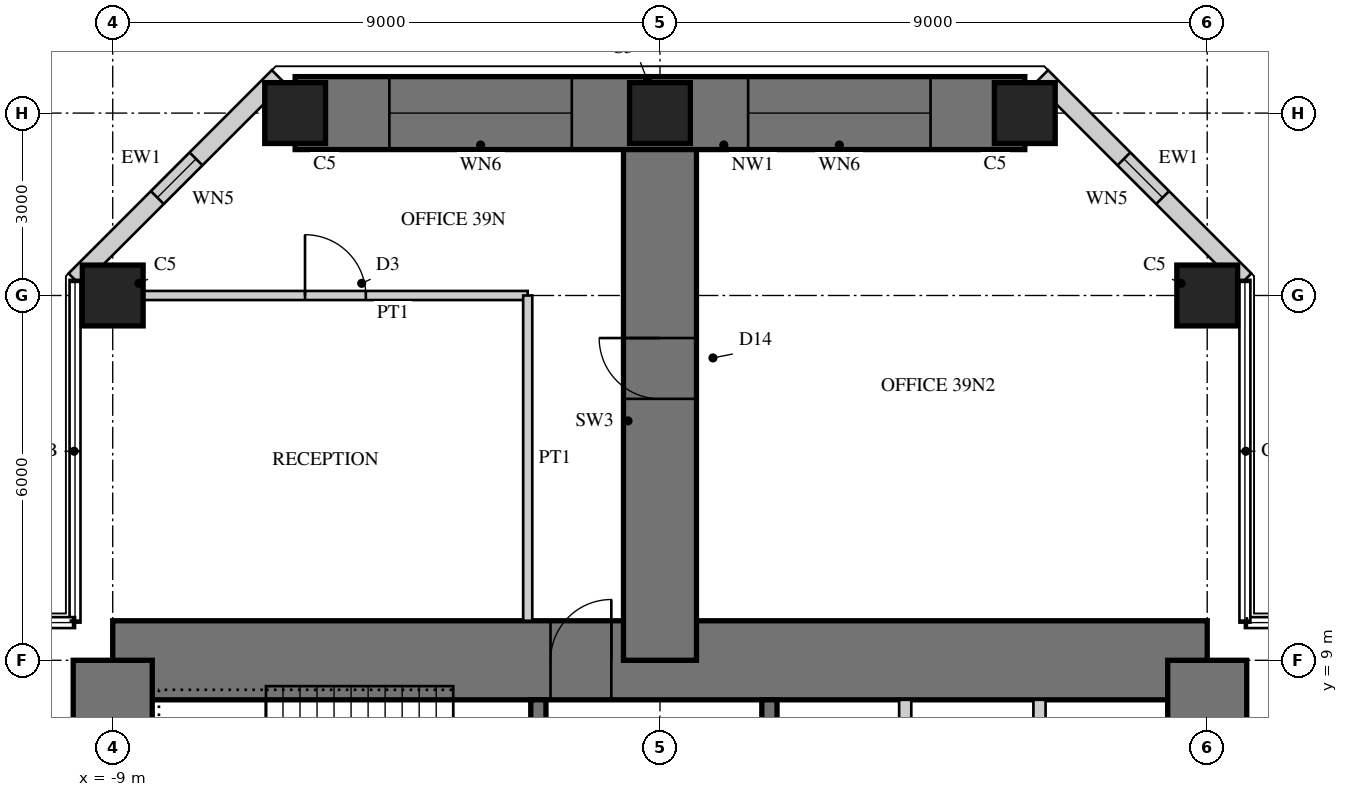
"""IFC4 building model, lengths in metres.
Left out: names, types, materials, properties, quantities, classifications, styles, units other than length and angle.
Written with IfcOpenShell. Run it as: python <this file> out.ifc"""

import sys

from ifc_helpers import new_model, si_unit, direction, frame, frame_2d, origin, origin_2d, place, context, subcontext, project, spatial, rectangle, hollow_rectangle, extrude, element, fill, save


model = new_model("IFC4")
c1 = context("Model", 3, precision=1e-05, world=origin(), true_north=direction((0.0, 1.0)))
c2 = subcontext(c1, "Body", "Model", "MODEL_VIEW")
j1 = project(units=[si_unit("LENGTHUNIT", "METRE"), si_unit("PLANEANGLEUNIT", "RADIAN")], contexts=[c1])
p1 = place(None, origin())
s1 = spatial("IfcSite", under=j1, at=p1, CompositionType="ELEMENT")
p2 = place(p1, origin())
s2 = spatial("IfcBuilding", under=s1, at=p2, CompositionType="ELEMENT")
p3 = place(p2, frame((0.0, 0.0, 160.5)))
s3 = spatial("IfcBuildingStorey", under=s2, at=p3, CompositionType="ELEMENT", Elevation=160.5)
p4 = place(p3, frame((9.0, 9.0, 0.0), z_axis=(0.0, 0.0, 1.0), x_axis=(-1.0, 0.0, 0.0)))
e1 = element("IfcWall", 1, at=p4, inside=s3, PredefinedType="SHEAR", context=c2, shape_type="SweptSolid", body=[
    extrude(rectangle(XDim=18.0, YDim=1.3, at=frame_2d((9.0, 0.0))), origin(), (0.0, 0.0, 1.0), 4.0),
])
p5 = place(p4, frame((9.8, 0.0, 0.0)))
e2 = element("IfcOpeningElement", 2, at=p5, cuts=e1, PredefinedType="OPENING", context=c2, shape_type="SweptSolid", body=[
    extrude(rectangle(XDim=1.0, YDim=2.4, at=frame_2d((0.5, 1.2))), frame((0.0, 0.66, 0.0), z_axis=(0.0, -1.0, 0.0), x_axis=(1.0, 0.0, 0.0)), (0.0, 0.0, 1.0), 1.32),
])
p6 = place(p3, frame((9.0, -9.0, 0.0), z_axis=(0.0, 0.0, 1.0), x_axis=(0.0, 1.0, 0.0)))
e3 = element("IfcWall", 3, at=p6, inside=s3, PredefinedType="SHEAR", context=c2, shape_type="SweptSolid", body=[
    extrude(rectangle(XDim=18.0, YDim=1.3, at=frame_2d((9.0, 0.0))), origin(), (0.0, 0.0, 1.0), 4.0),
])
p7 = place(p6, frame((9.8, 0.0, 0.0)))
e4 = element("IfcOpeningElement", 4, at=p7, cuts=e3, PredefinedType="OPENING", context=c2, shape_type="SweptSolid", body=[
    extrude(rectangle(XDim=1.0, YDim=2.4, at=frame_2d((0.5, 1.2))), frame((0.0, 0.66, 0.0), z_axis=(0.0, -1.0, 0.0), x_axis=(1.0, 0.0, 0.0)), (0.0, 0.0, 1.0), 1.32),
])
p8 = place(p3, frame((-9.0, 9.0, 0.0), z_axis=(0.0, 0.0, 1.0), x_axis=(0.0, -1.0, 0.0)))
e5 = element("IfcWall", 5, at=p8, inside=s3, PredefinedType="SHEAR", context=c2, shape_type="SweptSolid", body=[
    extrude(rectangle(XDim=18.0, YDim=1.3, at=frame_2d((9.0, 0.0))), origin(), (0.0, 0.0, 1.0), 4.0),
])
p9 = place(p8, frame((9.8, 0.0, 0.0)))
e6 = element("IfcOpeningElement", 6, at=p9, cuts=e5, PredefinedType="OPENING", context=c2, shape_type="SweptSolid", body=[
    extrude(rectangle(XDim=1.0, YDim=2.4, at=frame_2d((0.5, 1.2))), frame((0.0, 0.66, 0.0), z_axis=(0.0, -1.0, 0.0), x_axis=(1.0, 0.0, 0.0)), (0.0, 0.0, 1.0), 1.32),
])
p10 = place(p3, frame((1.8, 1.875, 0.0), z_axis=(0.0, 0.0, 1.0), x_axis=(0.0, 1.0, 0.0)))
e7 = element("IfcWall", 7, at=p10, inside=s3, PredefinedType="SHEAR", context=c2, shape_type="SweptSolid", body=[
    extrude(rectangle(XDim=6.475, YDim=0.25, at=frame_2d((3.238, 0.0))), origin(), (0.0, 0.0, 1.0), 4.0),
])
p11 = place(p10, frame((1.875, 0.0, 0.0)))
e8 = element("IfcOpeningElement", 8, at=p11, cuts=e7, PredefinedType="OPENING", context=c2, shape_type="SweptSolid", body=[
    extrude(rectangle(XDim=1.6, YDim=2.4, at=frame_2d((0.8, 1.2))), frame((0.0, 0.135, 0.0), z_axis=(0.0, -1.0, 0.0), x_axis=(1.0, 0.0, 0.0)), (0.0, 0.0, 1.0), 0.27),
])
for number, where, z_axis, x_axis in (
    (9, (4.033, 5.975, 0.0), (0.0, 0.0, 1.0), (0.0, 1.0, 0.0)),
    (10, (6.242, 5.975, 0.0), (0.0, 0.0, 1.0), (0.0, 1.0, 0.0)),
):
    element("IfcWall", number, at=place(p3, frame(where, z_axis=z_axis, x_axis=x_axis)), inside=s3, PredefinedType="PARTITIONING", context=c2, shape_type="SweptSolid", body=[
        extrude(rectangle(XDim=2.375, YDim=0.2, at=frame_2d((1.188, 0.0))), origin(), (0.0, 0.0, 1.0), 4.0),
    ])
p12 = place(p3, frame((-2.0, 1.675, 0.0), z_axis=(0.0, 0.0, 1.0), x_axis=(0.0, 1.0, 0.0)))
e11 = element("IfcWall", 11, at=p12, inside=s3, PredefinedType="SHEAR", context=c2, shape_type="SweptSolid", body=[
    extrude(rectangle(XDim=6.675, YDim=0.25, at=frame_2d((3.337, 0.0))), origin(), (0.0, 0.0, 1.0), 4.0),
])
p13 = place(p12, frame((0.725, 0.0, 0.0)))
e12 = element("IfcOpeningElement", 12, at=p13, cuts=e11, PredefinedType="OPENING", context=c2, shape_type="SweptSolid", body=[
    extrude(rectangle(XDim=1.0, YDim=2.1, at=frame_2d((0.5, 1.05))), frame((0.0, 0.135, 0.0), z_axis=(0.0, -1.0, 0.0), x_axis=(1.0, 0.0, 0.0)), (0.0, 0.0, 1.0), 0.27),
])
p14 = place(p3, frame((0.0, 9.0, 0.0), z_axis=(0.0, 0.0, 1.0), x_axis=(0.0, 1.0, 0.0)))
e13 = element("IfcWall", 13, at=p14, inside=s3, PredefinedType="SHEAR", context=c2, shape_type="SweptSolid", body=[
    extrude(rectangle(XDim=9.0, YDim=1.2, at=frame_2d((4.5, 0.0))), origin(), (0.0, 0.0, 1.0), 4.0),
])
p15 = place(p14, frame((4.3, 0.0, 0.0)))
e14 = element("IfcOpeningElement", 14, at=p15, cuts=e13, PredefinedType="OPENING", context=c2, shape_type="SweptSolid", body=[
    extrude(rectangle(XDim=1.0, YDim=2.2, at=frame_2d((0.5, 1.1))), frame((0.0, 0.61, 0.0), z_axis=(0.0, -1.0, 0.0), x_axis=(1.0, 0.0, 0.0)), (0.0, 0.0, 1.0), 1.22),
])
p16 = place(p3, frame((6.0, 18.0, 0.0), z_axis=(0.0, 0.0, 1.0), x_axis=(-1.0, 0.0, 0.0)))
e15 = element("IfcWall", 15, at=p16, inside=s3, PredefinedType="SHEAR", context=c2, shape_type="SweptSolid", body=[
    extrude(rectangle(XDim=12.0, YDim=1.2, at=frame_2d((6.0, 0.0))), origin(), (0.0, 0.0, 1.0), 4.0),
])
p17 = place(p16, frame((1.55, 0.0, 0.6)))
e16 = element("IfcOpeningElement", 16, at=p17, cuts=e15, PredefinedType="OPENING", context=c2, shape_type="SweptSolid", body=[
    extrude(rectangle(XDim=3.0, YDim=2.4, at=frame_2d((1.5, 1.2))), frame((0.0, 0.61, 0.0), z_axis=(0.0, -1.0, 0.0), x_axis=(1.0, 0.0, 0.0)), (0.0, 0.0, 1.0), 1.22),
])
p18 = place(p16, frame((7.45, 0.0, 0.6)))
e17 = element("IfcOpeningElement", 17, at=p18, cuts=e15, PredefinedType="OPENING", context=c2, shape_type="SweptSolid", body=[
    extrude(rectangle(XDim=3.0, YDim=2.4, at=frame_2d((1.5, 1.2))), frame((0.0, 0.61, 0.0), z_axis=(0.0, -1.0, 0.0), x_axis=(1.0, 0.0, 0.0)), (0.0, 0.0, 1.0), 1.22),
])
for number, where, z_axis, x_axis in (
    (18, (9.0, 15.0, 0.0), (0.0, 0.0, 1.0), (1.0, 0.0, 0.0)),
    (19, (-9.0, 15.0, 0.0), (0.0, 0.0, 1.0), (1.0, 0.0, 0.0)),
    (20, (6.0, 18.0, 0.0), (0.0, 0.0, 1.0), (1.0, 0.0, 0.0)),
    (21, (0.0, 18.0, 0.0), (0.0, 0.0, 1.0), (1.0, 0.0, 0.0)),
    (22, (-6.0, 18.0, 0.0), (0.0, 0.0, 1.0), (1.0, 0.0, 0.0)),
):
    element("IfcColumn", number, at=place(p3, frame(where, z_axis=z_axis, x_axis=x_axis)), inside=s3, PredefinedType="COLUMN", context=c2, shape_type="SweptSolid", body=[
        extrude(rectangle(XDim=1.0, YDim=1.0, at=origin_2d()), origin(), (0.0, 0.0, 1.0), 4.0),
    ])
p19 = place(p3, frame((9.62, 15.257, 0.0), z_axis=(0.0, 0.0, 1.0), x_axis=(-0.707106781187, 0.707106781187, 0.0)))
e23 = element("IfcWall", 23, at=p19, inside=s3, PredefinedType="SOLIDWALL", context=c2, shape_type="SweptSolid", body=[
    extrude(rectangle(XDim=4.728, YDim=0.3, at=frame_2d((2.364, 0.0))), origin(), (0.0, 0.0, 1.0), 3.75),
])
p20 = place(p19, frame((1.914, 0.0, 0.3)))
e24 = element("IfcOpeningElement", 24, at=p20, cuts=e23, PredefinedType="OPENING", context=c2, shape_type="SweptSolid", body=[
    extrude(rectangle(XDim=0.9, YDim=2.4, at=frame_2d((0.45, 1.2))), frame((0.0, 0.16, 0.0), z_axis=(0.0, -1.0, 0.0), x_axis=(1.0, 0.0, 0.0)), (0.0, 0.0, 1.0), 0.32),
])
p21 = place(p3, frame((-6.277, 18.6, 0.0), z_axis=(0.0, 0.0, 1.0), x_axis=(-0.707106781187, -0.707106781187, 0.0)))
e25 = element("IfcWall", 25, at=p21, inside=s3, PredefinedType="SOLIDWALL", context=c2, shape_type="SweptSolid", body=[
    extrude(rectangle(XDim=4.728, YDim=0.3, at=frame_2d((2.364, 0.0))), origin(), (0.0, 0.0, 1.0), 3.75),
])
p22 = place(p21, frame((1.914, 0.0, 0.3)))
e26 = element("IfcOpeningElement", 26, at=p22, cuts=e25, PredefinedType="OPENING", context=c2, shape_type="SweptSolid", body=[
    extrude(rectangle(XDim=0.9, YDim=2.4, at=frame_2d((0.45, 1.2))), frame((0.0, 0.16, 0.0), z_axis=(0.0, -1.0, 0.0), x_axis=(1.0, 0.0, 0.0)), (0.0, 0.0, 1.0), 0.32),
])
p23 = place(p3, frame((-2.175, 15.0, 0.0), z_axis=(0.0, 0.0, 1.0), x_axis=(-1.0, 0.0, 0.0)))
e27 = element("IfcWall", 27, at=p23, inside=s3, PredefinedType="PARTITIONING", context=c2, shape_type="SweptSolid", body=[
    extrude(rectangle(XDim=6.325, YDim=0.15, at=frame_2d((3.163, 0.0))), origin(), (0.0, 0.0, 1.0), 2.7),
])
p24 = place(p23, frame((2.663, 0.0, 0.0)))
e28 = element("IfcOpeningElement", 28, at=p24, cuts=e27, PredefinedType="OPENING", context=c2, shape_type="SweptSolid", body=[
    extrude(rectangle(XDim=1.0, YDim=2.1, at=frame_2d((0.5, 1.05))), frame((0.0, 0.085, 0.0), z_axis=(0.0, -1.0, 0.0), x_axis=(1.0, 0.0, 0.0)), (0.0, 0.0, 1.0), 0.17),
])
p25 = place(p3, frame((-2.175, 9.65, 0.0), z_axis=(0.0, 0.0, 1.0), x_axis=(0.0, 1.0, 0.0)))
e29 = element("IfcWall", 29, at=p25, inside=s3, PredefinedType="PARTITIONING", context=c2, shape_type="SweptSolid", body=[
    extrude(rectangle(XDim=5.35, YDim=0.15, at=frame_2d((2.675, 0.0))), origin(), (0.0, 0.0, 1.0), 3.75),
])
p26 = place(p20, origin())
e30 = element("IfcWindow", 30, at=p26, inside=s3, PartitioningType="SINGLE_PANEL", PredefinedType="WINDOW", context=c2, shape_type="SweptSolid", body=[
    extrude(hollow_rectangle(XDim=0.9, YDim=2.4, WallThickness=0.06, at=frame_2d((0.45, 1.2))), frame((0.0, 0.03, 0.0), z_axis=(0.0, -1.0, 0.0), x_axis=(1.0, 0.0, 0.0)), (0.0, 0.0, 1.0), 0.06),
    extrude(rectangle(XDim=0.779, YDim=2.279, at=frame_2d((0.45, 1.2))), frame((0.0, 0.03, 0.0), z_axis=(0.0, -1.0, 0.0), x_axis=(1.0, 0.0, 0.0)), (0.0, 0.0, 1.0), 0.06),
])
fill(e24, e30)
p27 = place(p17, origin())
e31 = element("IfcWindow", 31, at=p27, inside=s3, PartitioningType="SINGLE_PANEL", PredefinedType="WINDOW", context=c2, shape_type="SweptSolid", body=[
    extrude(hollow_rectangle(XDim=3.0, YDim=2.4, WallThickness=0.06, at=frame_2d((1.5, 1.2))), frame((0.0, 0.03, 0.0), z_axis=(0.0, -1.0, 0.0), x_axis=(1.0, 0.0, 0.0)), (0.0, 0.0, 1.0), 0.06),
    extrude(rectangle(XDim=2.879, YDim=2.279, at=frame_2d((1.5, 1.2))), frame((0.0, 0.03, 0.0), z_axis=(0.0, -1.0, 0.0), x_axis=(1.0, 0.0, 0.0)), (0.0, 0.0, 1.0), 0.06),
])
fill(e16, e31)
p28 = place(p18, origin())
e32 = element("IfcWindow", 32, at=p28, inside=s3, PartitioningType="SINGLE_PANEL", PredefinedType="WINDOW", context=c2, shape_type="SweptSolid", body=[
    extrude(hollow_rectangle(XDim=3.0, YDim=2.4, WallThickness=0.06, at=frame_2d((1.5, 1.2))), frame((0.0, 0.03, 0.0), z_axis=(0.0, -1.0, 0.0), x_axis=(1.0, 0.0, 0.0)), (0.0, 0.0, 1.0), 0.06),
    extrude(rectangle(XDim=2.879, YDim=2.279, at=frame_2d((1.5, 1.2))), frame((0.0, 0.03, 0.0), z_axis=(0.0, -1.0, 0.0), x_axis=(1.0, 0.0, 0.0)), (0.0, 0.0, 1.0), 0.06),
])
fill(e17, e32)
p29 = place(p22, origin())
e33 = element("IfcWindow", 33, at=p29, inside=s3, PartitioningType="SINGLE_PANEL", PredefinedType="WINDOW", context=c2, shape_type="SweptSolid", body=[
    extrude(hollow_rectangle(XDim=0.9, YDim=2.4, WallThickness=0.06, at=frame_2d((0.45, 1.2))), frame((0.0, 0.03, 0.0), z_axis=(0.0, -1.0, 0.0), x_axis=(1.0, 0.0, 0.0)), (0.0, 0.0, 1.0), 0.06),
    extrude(rectangle(XDim=0.779, YDim=2.279, at=frame_2d((0.45, 1.2))), frame((0.0, 0.03, 0.0), z_axis=(0.0, -1.0, 0.0), x_axis=(1.0, 0.0, 0.0)), (0.0, 0.0, 1.0), 0.06),
])
fill(e26, e33)
p30 = place(p24, frame((1.0, 0.0, 0.0), z_axis=(0.0, 0.0, 1.0), x_axis=(-1.0, 0.0, 0.0)))
e34 = element("IfcDoor", 34, at=p30, inside=s3, OperationType="SINGLE_SWING_LEFT", PredefinedType="DOOR", context=c2, shape_type="SweptSolid", body=[
    extrude(rectangle(XDim=1.0, YDim=2.1, at=frame_2d((0.5, 1.05))), frame((0.0, 0.025, 0.0), z_axis=(0.0, -1.0, 0.0), x_axis=(1.0, 0.0, 0.0)), (0.0, 0.0, 1.0), 0.05),
])
fill(e28, e34)
p31 = place(p15, origin())
e35 = element("IfcDoor", 35, at=p31, inside=s3, OperationType="SINGLE_SWING_RIGHT", PredefinedType="DOOR", context=c2, shape_type="SweptSolid", body=[
    extrude(rectangle(XDim=1.0, YDim=2.2, at=frame_2d((0.5, 1.1))), frame((0.0, 0.025, 0.0), z_axis=(0.0, -1.0, 0.0), x_axis=(1.0, 0.0, 0.0)), (0.0, 0.0, 1.0), 0.05),
])
fill(e14, e35)
p32 = place(p5, frame((1.0, 0.0, 0.0), z_axis=(0.0, 0.0, 1.0), x_axis=(-1.0, 0.0, 0.0)))
e36 = element("IfcDoor", 36, at=p32, inside=s3, OperationType="SINGLE_SWING_RIGHT", PredefinedType="DOOR", context=c2, shape_type="SweptSolid", body=[
    extrude(rectangle(XDim=1.0, YDim=2.4, at=frame_2d((0.5, 1.2))), frame((0.0, -0.005, 0.0), z_axis=(0.0, -1.0, 0.0), x_axis=(1.0, 0.0, 0.0)), (0.0, 0.0, 1.0), 0.05),
])
fill(e2, e36)
save(model, sys.argv[1])
